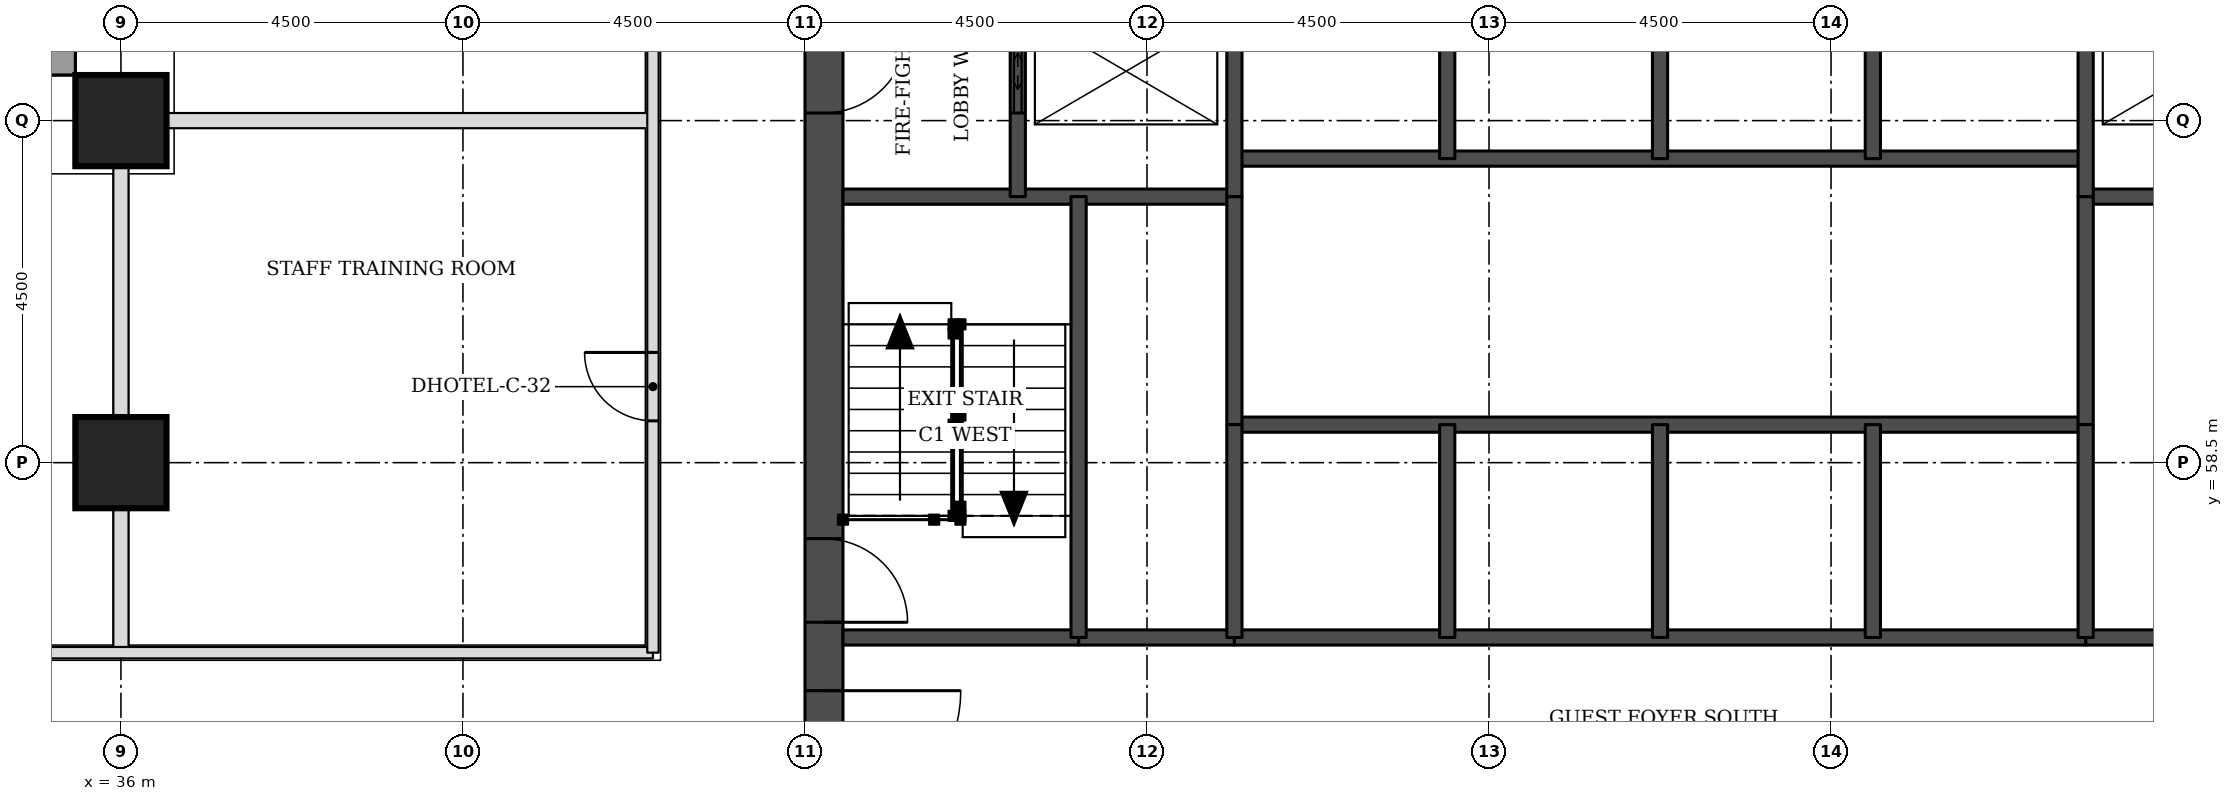
"""IFC4 building model, lengths in metres.
Left out: names, types, materials, properties, quantities, classifications, styles, units other than length and angle.
Written with IfcOpenShell. Run it as: python <this file> out.ifc"""

import sys

from ifc_helpers import new_model, si_unit, direction, frame, frame_2d, origin, origin_2d, place, context, subcontext, project, spatial, rectangle, extrude, element, fill, save


model = new_model("IFC4")
c1 = context("Model", 3, precision=1e-05, world=origin(), true_north=direction((0.0, 1.0)))
c2 = subcontext(c1, "Body", "Model", "MODEL_VIEW")
j1 = project(units=[si_unit("LENGTHUNIT", "METRE"), si_unit("PLANEANGLEUNIT", "RADIAN")], contexts=[c1])
p1 = place(None, origin())
s1 = spatial("IfcSite", under=j1, at=p1, CompositionType="ELEMENT")
p2 = place(p1, origin())
s2 = spatial("IfcBuilding", under=s1, at=p2, CompositionType="ELEMENT")
p3 = place(p2, frame((0.0, 0.0, 33.0)))
s3 = spatial("IfcBuildingStorey", under=s2, at=p3, CompositionType="ELEMENT", Elevation=33.0)
for number, where, z_axis, x_axis in (
    (1, (36.0, 58.5, 0.0), (0.0, 0.0, 1.0), (1.0, 0.0, 0.0)),
    (2, (36.0, 63.0, 0.0), (0.0, 0.0, 1.0), (1.0, 0.0, 0.0)),
):
    element("IfcColumn", number, at=place(p3, frame(where, z_axis=z_axis, x_axis=x_axis)), inside=s3, PredefinedType="COLUMN", context=c2, shape_type="SweptSolid", body=[
        extrude(rectangle(XDim=1.2, YDim=1.2, at=origin_2d()), origin(), (0.0, 0.0, 1.0), 3.3),
    ])
p4 = place(p3, frame((45.25, 49.5, 0.0), z_axis=(0.0, 0.0, 1.0), x_axis=(0.0, 1.0, 0.0)))
e3 = element("IfcWall", 3, at=p4, inside=s3, PredefinedType="SHEAR", context=c2, shape_type="SweptSolid", body=[
    extrude(rectangle(XDim=22.5, YDim=0.5, at=frame_2d((11.25, 0.0))), origin(), (0.0, 0.0, 1.0), 3.3),
])
p5 = place(p4, frame((4.2, 0.0, 0.0)))
e4 = element("IfcOpeningElement", 4, at=p5, cuts=e3, PredefinedType="OPENING", context=c2, shape_type="SweptSolid", body=[
    extrude(rectangle(XDim=1.8, YDim=2.1, at=frame_2d((0.9, 1.05))), frame((0.0, 0.26, 0.0), z_axis=(0.0, -1.0, 0.0), x_axis=(1.0, 0.0, 0.0)), (0.0, 0.0, 1.0), 0.52),
])
p6 = place(p4, frame((6.9, 0.0, 0.0)))
e5 = element("IfcOpeningElement", 5, at=p6, cuts=e3, PredefinedType="OPENING", context=c2, shape_type="SweptSolid", body=[
    extrude(rectangle(XDim=1.1, YDim=2.1, at=frame_2d((0.55, 1.05))), frame((0.0, 0.26, 0.0), z_axis=(0.0, -1.0, 0.0), x_axis=(1.0, 0.0, 0.0)), (0.0, 0.0, 1.0), 0.52),
])
p7 = place(p4, frame((13.6, 0.0, 0.0)))
e6 = element("IfcOpeningElement", 6, at=p7, cuts=e3, PredefinedType="OPENING", context=c2, shape_type="SweptSolid", body=[
    extrude(rectangle(XDim=1.1, YDim=2.1, at=frame_2d((0.55, 1.05))), frame((0.0, 0.26, 0.0), z_axis=(0.0, -1.0, 0.0), x_axis=(1.0, 0.0, 0.0)), (0.0, 0.0, 1.0), 0.52),
])
p8 = place(p4, frame((16.5, 0.0, 0.0)))
e7 = element("IfcOpeningElement", 7, at=p8, cuts=e3, PredefinedType="OPENING", context=c2, shape_type="SweptSolid", body=[
    extrude(rectangle(XDim=1.8, YDim=2.1, at=frame_2d((0.9, 1.05))), frame((0.0, 0.26, 0.0), z_axis=(0.0, -1.0, 0.0), x_axis=(1.0, 0.0, 0.0)), (0.0, 0.0, 1.0), 0.52),
])
p9 = place(p3, frame((35.225, 76.894, 0.0), z_axis=(0.0, 0.0, 1.0), x_axis=(0.0, -1.0, 0.0)))
e8 = element("IfcWall", 8, at=p9, inside=s3, PredefinedType="STANDARD", context=c2, shape_type="SweptSolid", body=[
    extrude(rectangle(XDim=13.293, YDim=0.35, at=frame_2d((6.647, 0.0))), origin(), (0.0, 0.0, 1.0), 3.055),
])
p10 = place(p9, frame((9.493, 0.0, 0.8)))
e9 = element("IfcOpeningElement", 9, at=p10, cuts=e8, PredefinedType="OPENING", context=c2, shape_type="SweptSolid", body=[
    extrude(rectangle(XDim=3.3, YDim=1.5, at=frame_2d((1.65, 0.75))), frame((0.0, 0.185, 0.0), z_axis=(0.0, -1.0, 0.0), x_axis=(1.0, 0.0, 0.0)), (0.0, 0.0, 1.0), 0.37),
])
p11 = place(p3, frame((35.4, 63.775, 0.0), z_axis=(0.0, 0.0, 1.0), x_axis=(-1.0, 0.0, 0.0)))
e10 = element("IfcWall", 10, at=p11, inside=s3, PredefinedType="STANDARD", context=c2, shape_type="SweptSolid", body=[
    extrude(rectangle(XDim=17.793, YDim=0.35, at=frame_2d((8.897, 0.0))), origin(), (0.0, 0.0, 1.0), 3.055),
])
p12 = place(p11, frame((0.5, 0.0, 0.8)))
e11 = element("IfcOpeningElement", 11, at=p12, cuts=e10, PredefinedType="OPENING", context=c2, shape_type="SweptSolid", body=[
    extrude(rectangle(XDim=3.3, YDim=1.5, at=frame_2d((1.65, 0.75))), frame((0.0, 0.185, 0.0), z_axis=(0.0, -1.0, 0.0), x_axis=(1.0, 0.0, 0.0)), (0.0, 0.0, 1.0), 0.37),
])
p13 = place(p11, frame((9.0, 0.0, 0.8)))
e12 = element("IfcOpeningElement", 12, at=p13, cuts=e10, PredefinedType="OPENING", context=c2, shape_type="SweptSolid", body=[
    extrude(rectangle(XDim=3.3, YDim=1.5, at=frame_2d((1.65, 0.75))), frame((0.0, 0.185, 0.0), z_axis=(0.0, -1.0, 0.0), x_axis=(1.0, 0.0, 0.0)), (0.0, 0.0, 1.0), 0.37),
])
p14 = place(p3, frame((36.0, 56.0, 0.0), z_axis=(0.0, 0.0, 1.0), x_axis=(0.0, 1.0, 0.0)))
e13 = element("IfcWall", 13, at=p14, inside=s3, PredefinedType="PARTITIONING", context=c2, shape_type="SweptSolid", body=[
    extrude(rectangle(XDim=6.4, YDim=0.2, at=frame_2d((3.2, 0.0))), origin(), (0.0, 0.0, 1.0), 2.33),
])
p15 = place(p3, frame((36.6, 63.0, 0.0), z_axis=(0.0, 0.0, 1.0), x_axis=(1.0, 0.0, 0.0)))
e14 = element("IfcWall", 14, at=p15, inside=s3, PredefinedType="PARTITIONING", context=c2, shape_type="SweptSolid", body=[
    extrude(rectangle(XDim=6.4, YDim=0.2, at=frame_2d((3.2, 0.0))), origin(), (0.0, 0.0, 1.0), 3.08),
])
p16 = place(p3, frame((27.0, 56.0, 0.0), z_axis=(0.0, 0.0, 1.0), x_axis=(1.0, 0.0, 0.0)))
e15 = element("IfcWall", 15, at=p16, inside=s3, PredefinedType="PARTITIONING", context=c2, shape_type="SweptSolid", body=[
    extrude(rectangle(XDim=16.0, YDim=0.15, at=frame_2d((8.0, 0.0))), origin(), (0.0, 0.0, 1.0), 3.08),
])
p17 = place(p16, frame((5.225, 0.0, 0.0)))
e16 = element("IfcOpeningElement", 16, at=p17, cuts=e15, PredefinedType="OPENING", context=c2, shape_type="SweptSolid", body=[
    extrude(rectangle(XDim=1.0, YDim=2.1, at=frame_2d((0.5, 1.05))), frame((0.0, 0.085, 0.0), z_axis=(0.0, -1.0, 0.0), x_axis=(1.0, 0.0, 0.0)), (0.0, 0.0, 1.0), 0.17),
])
p18 = place(p3, frame((43.0, 56.0, 0.0), z_axis=(0.0, 0.0, 1.0), x_axis=(0.0, 1.0, 0.0)))
e17 = element("IfcWall", 17, at=p18, inside=s3, PredefinedType="PARTITIONING", context=c2, shape_type="SweptSolid", body=[
    extrude(rectangle(XDim=18.0, YDim=0.15, at=frame_2d((9.0, 0.0))), origin(), (0.0, 0.0, 1.0), 3.08),
])
p19 = place(p18, frame((9.775, 0.0, 0.0)))
e18 = element("IfcOpeningElement", 18, at=p19, cuts=e17, PredefinedType="OPENING", context=c2, shape_type="SweptSolid", body=[
    extrude(rectangle(XDim=1.0, YDim=2.1, at=frame_2d((0.5, 1.05))), frame((0.0, 0.085, 0.0), z_axis=(0.0, -1.0, 0.0), x_axis=(1.0, 0.0, 0.0)), (0.0, 0.0, 1.0), 0.17),
])
p20 = place(p18, frame((16.553, 0.0, 0.0)))
e19 = element("IfcOpeningElement", 19, at=p20, cuts=e17, PredefinedType="OPENING", context=c2, shape_type="SweptSolid", body=[
    extrude(rectangle(XDim=1.0, YDim=2.1, at=frame_2d((0.5, 1.05))), frame((0.0, 0.085, 0.0), z_axis=(0.0, -1.0, 0.0), x_axis=(1.0, 0.0, 0.0)), (0.0, 0.0, 1.0), 0.17),
])
p21 = place(p18, frame((3.05, 0.0, 0.0)))
e20 = element("IfcOpeningElement", 20, at=p21, cuts=e17, PredefinedType="OPENING", context=c2, shape_type="SweptSolid", body=[
    extrude(rectangle(XDim=0.9, YDim=2.1, at=frame_2d((0.45, 1.05))), frame((0.0, 0.085, 0.0), z_axis=(0.0, -1.0, 0.0), x_axis=(1.0, 0.0, 0.0)), (0.0, 0.0, 1.0), 0.17),
])
for number, where, z_axis, x_axis in (
    (21, (48.6, 56.2, 0.0), (0.0, 0.0, 1.0), (1.0, 0.0, 0.0)),
    (22, (61.85, 56.2, 0.0), (0.0, 0.0, 1.0), (1.0, 0.0, 0.0)),
):
    element("IfcWall", number, at=place(p3, frame(where, z_axis=z_axis, x_axis=x_axis)), inside=s3, PredefinedType="SOLIDWALL", context=c2, shape_type="SweptSolid", body=[
        extrude(rectangle(XDim=2.05, YDim=0.2, at=frame_2d((1.025, 0.0))), origin(), (0.0, 0.0, 1.0), 3.08),
    ])
p22 = place(p3, frame((45.5, 56.2, 0.0), z_axis=(0.0, 0.0, 1.0), x_axis=(1.0, 0.0, 0.0)))
e23 = element("IfcWall", 23, at=p22, inside=s3, PredefinedType="SOLIDWALL", context=c2, shape_type="SweptSolid", body=[
    extrude(rectangle(XDim=3.1, YDim=0.2, at=frame_2d((1.55, 0.0))), origin(), (0.0, 0.0, 1.0), 3.08),
])
p23 = place(p3, frame((50.65, 56.2, 0.0), z_axis=(0.0, 0.0, 1.0), x_axis=(1.0, 0.0, 0.0)))
e24 = element("IfcWall", 24, at=p23, inside=s3, PredefinedType="SOLIDWALL", context=c2, shape_type="SweptSolid", body=[
    extrude(rectangle(XDim=11.2, YDim=0.2, at=frame_2d((5.6, 0.0))), origin(), (0.0, 0.0, 1.0), 3.08),
])
p24 = place(p3, frame((50.65, 59.0, 0.0), z_axis=(0.0, 0.0, 1.0), x_axis=(1.0, 0.0, 0.0)))
e25 = element("IfcWall", 25, at=p24, inside=s3, PredefinedType="SOLIDWALL", context=c2, shape_type="SweptSolid", body=[
    extrude(rectangle(XDim=11.2, YDim=0.2, at=frame_2d((5.6, 0.0))), origin(), (0.0, 0.0, 1.0), 3.3),
])
for number, where, z_axis, x_axis in (
    (26, (45.5, 62.0, 0.0), (0.0, 0.0, 1.0), (1.0, 0.0, 0.0)),
    (27, (61.85, 62.0, 0.0), (0.0, 0.0, 1.0), (1.0, 0.0, 0.0)),
):
    element("IfcWall", number, at=place(p3, frame(where, z_axis=z_axis, x_axis=x_axis)), inside=s3, PredefinedType="SOLIDWALL", context=c2, shape_type="SweptSolid", body=[
        extrude(rectangle(XDim=5.15, YDim=0.2, at=frame_2d((2.575, 0.0))), origin(), (0.0, 0.0, 1.0), 3.08),
    ])
p25 = place(p3, frame((50.65, 62.5, 0.0), z_axis=(0.0, 0.0, 1.0), x_axis=(1.0, 0.0, 0.0)))
e28 = element("IfcWall", 28, at=p25, inside=s3, PredefinedType="SOLIDWALL", context=c2, shape_type="SweptSolid", body=[
    extrude(rectangle(XDim=11.2, YDim=0.2, at=frame_2d((5.6, 0.0))), origin(), (0.0, 0.0, 1.0), 3.3),
])
p26 = place(p3, frame((47.8, 62.0, 0.0), z_axis=(0.0, 0.0, 1.0), x_axis=(0.0, 1.0, 0.0)))
e29 = element("IfcWall", 29, at=p26, inside=s3, PredefinedType="SOLIDWALL", context=c2, shape_type="SweptSolid", body=[
    extrude(rectangle(XDim=3.3, YDim=0.2, at=frame_2d((1.65, 0.0))), origin(), (0.0, 0.0, 1.0), 3.08),
])
p27 = place(p26, frame((1.1, 0.0, 0.0)))
e30 = element("IfcOpeningElement", 30, at=p27, cuts=e29, PredefinedType="OPENING", context=c2, shape_type="SweptSolid", body=[
    extrude(rectangle(XDim=1.1, YDim=2.1, at=frame_2d((0.55, 1.05))), frame((0.0, 0.11, 0.0), z_axis=(0.0, -1.0, 0.0), x_axis=(1.0, 0.0, 0.0)), (0.0, 0.0, 1.0), 0.22),
])
p28 = place(p3, frame((48.6, 56.2, 0.0), z_axis=(0.0, 0.0, 1.0), x_axis=(0.0, 1.0, 0.0)))
e31 = element("IfcWall", 31, at=p28, inside=s3, PredefinedType="SOLIDWALL", context=c2, shape_type="SweptSolid", body=[
    extrude(rectangle(XDim=5.8, YDim=0.2, at=frame_2d((2.9, 0.0))), origin(), (0.0, 0.0, 1.0), 3.08),
])
p29 = place(p3, frame((50.65, 59.0, 0.0), z_axis=(0.0, 0.0, 1.0), x_axis=(0.0, 1.0, 0.0)))
e32 = element("IfcWall", 32, at=p29, inside=s3, PredefinedType="SOLIDWALL", context=c2, shape_type="SweptSolid", body=[
    extrude(rectangle(XDim=3.0, YDim=0.2, at=frame_2d((1.5, 0.0))), origin(), (0.0, 0.0, 1.0), 3.3),
])
p30 = place(p3, frame((50.65, 56.2, 0.0), z_axis=(0.0, 0.0, 1.0), x_axis=(0.0, 1.0, 0.0)))
e33 = element("IfcWall", 33, at=p30, inside=s3, PredefinedType="SOLIDWALL", context=c2, shape_type="SweptSolid", body=[
    extrude(rectangle(XDim=2.8, YDim=0.2, at=frame_2d((1.4, 0.0))), origin(), (0.0, 0.0, 1.0), 3.08),
])
p31 = place(p3, frame((50.65, 62.0, 0.0), z_axis=(0.0, 0.0, 1.0), x_axis=(0.0, 1.0, 0.0)))
e34 = element("IfcWall", 34, at=p31, inside=s3, PredefinedType="SOLIDWALL", context=c2, shape_type="SweptSolid", body=[
    extrude(rectangle(XDim=3.3, YDim=0.2, at=frame_2d((1.65, 0.0))), origin(), (0.0, 0.0, 1.0), 3.08),
])
for number, where, z_axis, x_axis in (
    (35, (53.45, 56.2, 0.0), (0.0, 0.0, 1.0), (0.0, 1.0, 0.0)),
    (36, (53.45, 62.5, 0.0), (0.0, 0.0, 1.0), (0.0, 1.0, 0.0)),
    (37, (56.25, 56.2, 0.0), (0.0, 0.0, 1.0), (0.0, 1.0, 0.0)),
    (38, (56.25, 62.5, 0.0), (0.0, 0.0, 1.0), (0.0, 1.0, 0.0)),
    (39, (59.05, 56.2, 0.0), (0.0, 0.0, 1.0), (0.0, 1.0, 0.0)),
    (40, (59.05, 62.5, 0.0), (0.0, 0.0, 1.0), (0.0, 1.0, 0.0)),
):
    element("IfcWall", number, at=place(p3, frame(where, z_axis=z_axis, x_axis=x_axis)), inside=s3, PredefinedType="SOLIDWALL", context=c2, shape_type="SweptSolid", body=[
        extrude(rectangle(XDim=2.8, YDim=0.2, at=frame_2d((1.4, 0.0))), origin(), (0.0, 0.0, 1.0), 3.08),
    ])
p32 = place(p3, frame((61.85, 59.0, 0.0), z_axis=(0.0, 0.0, 1.0), x_axis=(0.0, 1.0, 0.0)))
e41 = element("IfcWall", 41, at=p32, inside=s3, PredefinedType="SOLIDWALL", context=c2, shape_type="SweptSolid", body=[
    extrude(rectangle(XDim=3.0, YDim=0.2, at=frame_2d((1.5, 0.0))), origin(), (0.0, 0.0, 1.0), 3.3),
])
p33 = place(p3, frame((61.85, 56.2, 0.0), z_axis=(0.0, 0.0, 1.0), x_axis=(0.0, 1.0, 0.0)))
e42 = element("IfcWall", 42, at=p33, inside=s3, PredefinedType="SOLIDWALL", context=c2, shape_type="SweptSolid", body=[
    extrude(rectangle(XDim=2.8, YDim=0.2, at=frame_2d((1.4, 0.0))), origin(), (0.0, 0.0, 1.0), 3.08),
])
p34 = place(p3, frame((61.85, 62.0, 0.0), z_axis=(0.0, 0.0, 1.0), x_axis=(0.0, 1.0, 0.0)))
e43 = element("IfcWall", 43, at=p34, inside=s3, PredefinedType="SOLIDWALL", context=c2, shape_type="SweptSolid", body=[
    extrude(rectangle(XDim=3.3, YDim=0.2, at=frame_2d((1.65, 0.0))), origin(), (0.0, 0.0, 1.0), 3.08),
])
p35 = place(p21, origin())
e44 = element("IfcDoor", 44, at=p35, inside=s3, OperationType="SINGLE_SWING_RIGHT", PredefinedType="DOOR", context=c2, shape_type="SweptSolid", body=[
    extrude(rectangle(XDim=0.9, YDim=2.1, at=frame_2d((0.45, 1.05))), frame((0.0, 0.025, 0.0), z_axis=(0.0, -1.0, 0.0), x_axis=(1.0, 0.0, 0.0)), (0.0, 0.0, 1.0), 0.05),
])
fill(e20, e44)
p36 = place(p27, origin())
e45 = element("IfcDoor", 45, at=p36, inside=s3, OperationType="DOUBLE_DOOR_SLIDING", PredefinedType="DOOR", context=c2, shape_type="SweptSolid", body=[
    extrude(rectangle(XDim=1.1, YDim=2.1, at=frame_2d((0.55, 1.05))), frame((0.0, 0.025, 0.0), z_axis=(0.0, -1.0, 0.0), x_axis=(1.0, 0.0, 0.0)), (0.0, 0.0, 1.0), 0.05),
])
fill(e30, e45)
p37 = place(p5, frame((1.8, 0.0, 0.0), z_axis=(0.0, 0.0, 1.0), x_axis=(-1.0, 0.0, 0.0)))
e46 = element("IfcDoor", 46, at=p37, inside=s3, OperationType="SINGLE_SWING_LEFT", PredefinedType="DOOR", context=c2, shape_type="SweptSolid", body=[
    extrude(rectangle(XDim=1.8, YDim=2.1, at=frame_2d((0.9, 1.05))), frame((0.0, 0.025, 0.0), z_axis=(0.0, -1.0, 0.0), x_axis=(1.0, 0.0, 0.0)), (0.0, 0.0, 1.0), 0.05),
])
fill(e4, e46)
p38 = place(p6, frame((1.1, 0.0, 0.0), z_axis=(0.0, 0.0, 1.0), x_axis=(-1.0, 0.0, 0.0)))
e47 = element("IfcDoor", 47, at=p38, inside=s3, OperationType="SINGLE_SWING_RIGHT", PredefinedType="DOOR", context=c2, shape_type="SweptSolid", body=[
    extrude(rectangle(XDim=1.1, YDim=2.1, at=frame_2d((0.55, 1.05))), frame((0.0, 0.025, 0.0), z_axis=(0.0, -1.0, 0.0), x_axis=(1.0, 0.0, 0.0)), (0.0, 0.0, 1.0), 0.05),
])
fill(e5, e47)
p39 = place(p7, frame((1.1, 0.0, 0.0), z_axis=(0.0, 0.0, 1.0), x_axis=(-1.0, 0.0, 0.0)))
e48 = element("IfcDoor", 48, at=p39, inside=s3, OperationType="SINGLE_SWING_LEFT", PredefinedType="DOOR", context=c2, shape_type="SweptSolid", body=[
    extrude(rectangle(XDim=1.1, YDim=2.1, at=frame_2d((0.55, 1.05))), frame((0.0, 0.025, 0.0), z_axis=(0.0, -1.0, 0.0), x_axis=(1.0, 0.0, 0.0)), (0.0, 0.0, 1.0), 0.05),
])
fill(e6, e48)
save(model, sys.argv[1])
